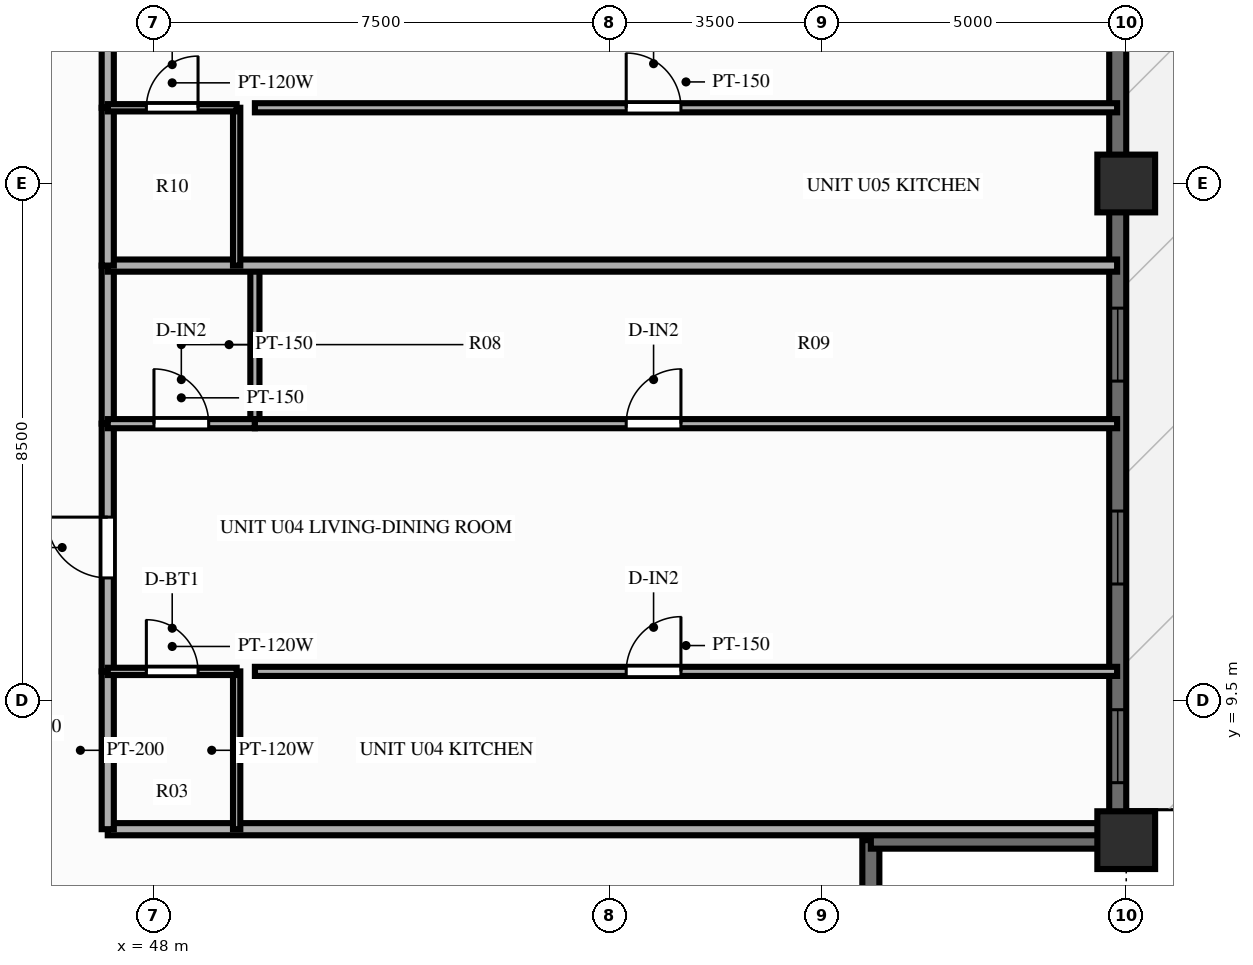
"""IFC4 building model, lengths in metres.
Left out: names, types, materials, properties, quantities, classifications, styles, units other than length and angle.
Written with IfcOpenShell. Run it as: python <this file> out.ifc"""

import sys

from ifc_helpers import new_model, si_unit, direction, frame, frame_2d, origin, origin_2d, place, context, subcontext, project, spatial, rectangle, extrude, source, transform, mapped, element, fill, save


model = new_model("IFC4")
c1 = context("Model", 3, precision=1e-05, world=origin(), true_north=direction((0.0, 1.0)))
c2 = subcontext(c1, "Body", "Model", "MODEL_VIEW")
j1 = project(units=[si_unit("LENGTHUNIT", "METRE"), si_unit("PLANEANGLEUNIT", "RADIAN")], contexts=[c1])
p1 = place(None, origin())
s1 = spatial("IfcSite", under=j1, at=p1, CompositionType="ELEMENT")
p2 = place(p1, origin())
s2 = spatial("IfcBuilding", under=s1, at=p2, CompositionType="ELEMENT")
p3 = place(p2, frame((0.0, 0.0, 101.85)))
s3 = spatial("IfcBuildingStorey", under=s2, at=p3, CompositionType="ELEMENT", Elevation=101.85)
m1 = source(origin(), c2, "Body", "SweptSolid", [
    extrude(rectangle(XDim=0.95, YDim=0.95, at=origin_2d()), origin(), (0.0, 0.0, 1.0), 3.0),
])
for number, where, z_axis, x_axis in (
    (1, (64.0, 7.2, 0.0), (0.0, 0.0, 1.0), (1.0, 0.0, 0.0)),
    (2, (64.0, 18.0, 0.0), (0.0, 0.0, 1.0), (1.0, 0.0, 0.0)),
):
    element("IfcColumn", number, at=place(p3, frame(where, z_axis=z_axis, x_axis=x_axis)), inside=s3, PredefinedType="COLUMN", context=c2, shape_type="MappedRepresentation", body=[
        mapped(m1, transform((0.0, 0.0, 0.0), scale=1.0)),
    ])
p4 = place(p3, frame((63.86, 7.2, 0.0), z_axis=(0.0, 0.0, 1.0), x_axis=(0.0, 1.0, 0.0)))
e3 = element("IfcWall", 3, at=p4, inside=s3, PredefinedType="SOLIDWALL", context=c2, shape_type="SweptSolid", body=[
    extrude(rectangle(XDim=39.6, YDim=0.28, at=frame_2d((19.8, 0.0))), origin(), (0.0, 0.0, 1.0), 2.28),
])
p5 = place(p4, frame((0.945, 0.0, 0.25)))
e4 = element("IfcOpeningElement", 4, at=p5, cuts=e3, PredefinedType="OPENING", context=c2, shape_type="SweptSolid", body=[
    extrude(rectangle(XDim=1.2, YDim=1.5, at=frame_2d((0.6, 0.75))), frame((0.0, 0.152, 0.0), z_axis=(0.0, -1.0, 0.0), x_axis=(1.0, 0.0, 0.0)), (0.0, 0.0, 1.0), 0.304),
])
p6 = place(p4, frame((4.213, 0.0, 0.25)))
e5 = element("IfcOpeningElement", 5, at=p6, cuts=e3, PredefinedType="OPENING", context=c2, shape_type="SweptSolid", body=[
    extrude(rectangle(XDim=1.2, YDim=1.5, at=frame_2d((0.6, 0.75))), frame((0.0, 0.152, 0.0), z_axis=(0.0, -1.0, 0.0), x_axis=(1.0, 0.0, 0.0)), (0.0, 0.0, 1.0), 0.304),
])
p7 = place(p4, frame((7.55, 0.0, 0.25)))
e6 = element("IfcOpeningElement", 6, at=p7, cuts=e3, PredefinedType="OPENING", context=c2, shape_type="SweptSolid", body=[
    extrude(rectangle(XDim=1.2, YDim=1.5, at=frame_2d((0.6, 0.75))), frame((0.0, 0.152, 0.0), z_axis=(0.0, -1.0, 0.0), x_axis=(1.0, 0.0, 0.0)), (0.0, 0.0, 1.0), 0.304),
])
p8 = place(p4, frame((13.483, 0.0, 0.25)))
e7 = element("IfcOpeningElement", 7, at=p8, cuts=e3, PredefinedType="OPENING", context=c2, shape_type="SweptSolid", body=[
    extrude(rectangle(XDim=1.2, YDim=1.5, at=frame_2d((0.6, 0.75))), frame((0.0, 0.152, 0.0), z_axis=(0.0, -1.0, 0.0), x_axis=(1.0, 0.0, 0.0)), (0.0, 0.0, 1.0), 0.304),
])
p9 = place(p4, frame((16.82, 0.0, 0.25)))
e8 = element("IfcOpeningElement", 8, at=p9, cuts=e3, PredefinedType="OPENING", context=c2, shape_type="SweptSolid", body=[
    extrude(rectangle(XDim=1.2, YDim=1.5, at=frame_2d((0.6, 0.75))), frame((0.0, 0.152, 0.0), z_axis=(0.0, -1.0, 0.0), x_axis=(1.0, 0.0, 0.0)), (0.0, 0.0, 1.0), 0.304),
])
p10 = place(p4, frame((19.2, 0.0, 0.25)))
e9 = element("IfcOpeningElement", 9, at=p10, cuts=e3, PredefinedType="OPENING", context=c2, shape_type="SweptSolid", body=[
    extrude(rectangle(XDim=1.2, YDim=1.5, at=frame_2d((0.6, 0.75))), frame((0.0, 0.152, 0.0), z_axis=(0.0, -1.0, 0.0), x_axis=(1.0, 0.0, 0.0)), (0.0, 0.0, 1.0), 0.304),
])
p11 = place(p4, frame((21.578, 0.0, 0.25)))
e10 = element("IfcOpeningElement", 10, at=p11, cuts=e3, PredefinedType="OPENING", context=c2, shape_type="SweptSolid", body=[
    extrude(rectangle(XDim=1.2, YDim=1.5, at=frame_2d((0.6, 0.75))), frame((0.0, 0.152, 0.0), z_axis=(0.0, -1.0, 0.0), x_axis=(1.0, 0.0, 0.0)), (0.0, 0.0, 1.0), 0.304),
])
p12 = place(p4, frame((26.313, 0.0, 0.0), z_axis=(0.0, 0.0, 1.0), x_axis=(-1.0, 0.0, 0.0)))
e11 = element("IfcOpeningElement", 11, at=p12, cuts=e3, PredefinedType="OPENING", context=c2, shape_type="SweptSolid", body=[
    extrude(rectangle(XDim=1.6, YDim=2.15, at=frame_2d((0.8, 1.075))), frame((0.0, 0.152, 0.0), z_axis=(0.0, -1.0, 0.0), x_axis=(1.0, 0.0, 0.0)), (0.0, 0.0, 1.0), 0.304),
])
p13 = place(p4, frame((29.305, 0.0, 0.25)))
e12 = element("IfcOpeningElement", 12, at=p13, cuts=e3, PredefinedType="OPENING", context=c2, shape_type="SweptSolid", body=[
    extrude(rectangle(XDim=0.7, YDim=1.5, at=frame_2d((0.35, 0.75))), frame((0.0, 0.152, 0.0), z_axis=(0.0, -1.0, 0.0), x_axis=(1.0, 0.0, 0.0)), (0.0, 0.0, 1.0), 0.304),
])
p14 = place(p4, frame((30.848, 0.0, 0.25)))
e13 = element("IfcOpeningElement", 13, at=p14, cuts=e3, PredefinedType="OPENING", context=c2, shape_type="SweptSolid", body=[
    extrude(rectangle(XDim=1.2, YDim=1.5, at=frame_2d((0.6, 0.75))), frame((0.0, 0.152, 0.0), z_axis=(0.0, -1.0, 0.0), x_axis=(1.0, 0.0, 0.0)), (0.0, 0.0, 1.0), 0.304),
])
p15 = place(p4, frame((34.183, 0.0, 0.25)))
e14 = element("IfcOpeningElement", 14, at=p15, cuts=e3, PredefinedType="OPENING", context=c2, shape_type="SweptSolid", body=[
    extrude(rectangle(XDim=1.2, YDim=1.5, at=frame_2d((0.6, 0.75))), frame((0.0, 0.152, 0.0), z_axis=(0.0, -1.0, 0.0), x_axis=(1.0, 0.0, 0.0)), (0.0, 0.0, 1.0), 0.304),
])
p16 = place(p4, frame((37.452, 0.0, 0.25)))
e15 = element("IfcOpeningElement", 15, at=p16, cuts=e3, PredefinedType="OPENING", context=c2, shape_type="SweptSolid", body=[
    extrude(rectangle(XDim=1.2, YDim=1.5, at=frame_2d((0.6, 0.75))), frame((0.0, 0.152, 0.0), z_axis=(0.0, -1.0, 0.0), x_axis=(1.0, 0.0, 0.0)), (0.0, 0.0, 1.0), 0.304),
])
for number, where, z_axis, x_axis in (
    (16, (59.8, 3.08, 0.0), (0.0, 0.0, 1.0), (0.0, 1.0, 0.0)),
    (17, (59.8, 7.2, 0.0), (0.0, 0.0, 1.0), (1.0, 0.0, 0.0)),
):
    element("IfcWall", number, at=place(p3, frame(where, z_axis=z_axis, x_axis=x_axis)), inside=s3, PredefinedType="SOLIDWALL", context=c2, shape_type="SweptSolid", body=[
        extrude(rectangle(XDim=4.12, YDim=0.28, at=frame_2d((2.06, 0.0))), origin(), (0.0, 0.0, 1.0), 2.28),
    ])
p17 = place(p3, frame((47.25, 7.38, 0.0), z_axis=(0.0, 0.0, 1.0), x_axis=(1.0, 0.0, 0.0)))
e18 = element("IfcWall", 18, at=p17, inside=s3, PredefinedType="PARTITIONING", context=c2, shape_type="SweptSolid", body=[
    extrude(rectangle(XDim=16.6, YDim=0.2, at=frame_2d((8.3, 0.0))), origin(), (0.0, 0.0, 1.0), 2.79),
])
p18 = place(p3, frame((47.25, 7.38, 0.0), z_axis=(0.0, 0.0, 1.0), x_axis=(0.0, 1.0, 0.0)))
e19 = element("IfcWall", 19, at=p18, inside=s3, PredefinedType="PARTITIONING", context=c2, shape_type="SweptSolid", body=[
    extrude(rectangle(XDim=2.596, YDim=0.2, at=frame_2d((1.298, 0.0))), origin(), (0.0, 0.0, 1.0), 2.79),
])
p19 = place(p3, frame((47.25, 9.976, 0.0), z_axis=(0.0, 0.0, 1.0), x_axis=(0.0, 1.0, 0.0)))
e20 = element("IfcWall", 20, at=p19, inside=s3, PredefinedType="PARTITIONING", context=c2, shape_type="SweptSolid", body=[
    extrude(rectangle(XDim=4.074, YDim=0.2, at=frame_2d((2.037, 0.0))), origin(), (0.0, 0.0, 1.0), 2.79),
])
p20 = place(p19, frame((1.537, 0.0, 0.0)))
e21 = element("IfcOpeningElement", 21, at=p20, cuts=e20, PredefinedType="OPENING", context=c2, shape_type="SweptSolid", body=[
    extrude(rectangle(XDim=1.0, YDim=2.15, at=frame_2d((0.5, 1.075))), frame((0.0, 0.112, 0.0), z_axis=(0.0, -1.0, 0.0), x_axis=(1.0, 0.0, 0.0)), (0.0, 0.0, 1.0), 0.224),
])
p21 = place(p3, frame((47.25, 14.05, 0.0), z_axis=(0.0, 0.0, 1.0), x_axis=(0.0, 1.0, 0.0)))
e22 = element("IfcWall", 22, at=p21, inside=s3, PredefinedType="PARTITIONING", context=c2, shape_type="SweptSolid", body=[
    extrude(rectangle(XDim=2.6, YDim=0.2, at=frame_2d((1.3, 0.0))), origin(), (0.0, 0.0, 1.0), 2.79),
])
p22 = place(p3, frame((49.37, 7.38, 0.0), z_axis=(0.0, 0.0, 1.0), x_axis=(0.0, 1.0, 0.0)))
e23 = element("IfcWall", 23, at=p22, inside=s3, PredefinedType="PARTITIONING", context=c2, shape_type="SweptSolid", body=[
    extrude(rectangle(XDim=2.596, YDim=0.12, at=frame_2d((1.298, 0.0))), origin(), (0.0, 0.0, 1.0), 2.79),
])
p23 = place(p3, frame((49.67, 14.05, 0.0), z_axis=(0.0, 0.0, 1.0), x_axis=(0.0, 1.0, 0.0)))
e24 = element("IfcWall", 24, at=p23, inside=s3, PredefinedType="PARTITIONING", context=c2, shape_type="SweptSolid", body=[
    extrude(rectangle(XDim=2.6, YDim=0.15, at=frame_2d((1.3, 0.0))), origin(), (0.0, 0.0, 1.0), 2.79),
])
p24 = place(p3, frame((47.25, 9.976, 0.0), z_axis=(0.0, 0.0, 1.0), x_axis=(1.0, 0.0, 0.0)))
e25 = element("IfcWall", 25, at=p24, inside=s3, PredefinedType="PARTITIONING", context=c2, shape_type="SweptSolid", body=[
    extrude(rectangle(XDim=2.12, YDim=0.12, at=frame_2d((1.06, 0.0))), origin(), (0.0, 0.0, 1.0), 2.79),
])
p25 = place(p24, frame((0.635, 0.0, 0.0)))
e26 = element("IfcOpeningElement", 26, at=p25, cuts=e25, PredefinedType="OPENING", context=c2, shape_type="SweptSolid", body=[
    extrude(rectangle(XDim=0.85, YDim=2.05, at=frame_2d((0.425, 1.025))), frame((0.0, 0.072, 0.0), z_axis=(0.0, -1.0, 0.0), x_axis=(1.0, 0.0, 0.0)), (0.0, 0.0, 1.0), 0.144),
])
p26 = place(p3, frame((49.67, 9.976, 0.0), z_axis=(0.0, 0.0, 1.0), x_axis=(1.0, 0.0, 0.0)))
e27 = element("IfcWall", 27, at=p26, inside=s3, PredefinedType="PARTITIONING", context=c2, shape_type="SweptSolid", body=[
    extrude(rectangle(XDim=14.18, YDim=0.15, at=frame_2d((7.09, 0.0))), origin(), (0.0, 0.0, 1.0), 2.79),
])
p27 = place(p26, frame((6.107, 0.0, 0.0)))
e28 = element("IfcOpeningElement", 28, at=p27, cuts=e27, PredefinedType="OPENING", context=c2, shape_type="SweptSolid", body=[
    extrude(rectangle(XDim=0.9, YDim=2.1, at=frame_2d((0.45, 1.05))), frame((0.0, 0.087, 0.0), z_axis=(0.0, -1.0, 0.0), x_axis=(1.0, 0.0, 0.0)), (0.0, 0.0, 1.0), 0.174),
])
p28 = place(p3, frame((47.25, 14.05, 0.0), z_axis=(0.0, 0.0, 1.0), x_axis=(1.0, 0.0, 0.0)))
e29 = element("IfcWall", 29, at=p28, inside=s3, PredefinedType="PARTITIONING", context=c2, shape_type="SweptSolid", body=[
    extrude(rectangle(XDim=2.42, YDim=0.15, at=frame_2d((1.21, 0.0))), origin(), (0.0, 0.0, 1.0), 2.79),
])
p29 = place(p28, frame((0.76, 0.0, 0.0)))
e30 = element("IfcOpeningElement", 30, at=p29, cuts=e29, PredefinedType="OPENING", context=c2, shape_type="SweptSolid", body=[
    extrude(rectangle(XDim=0.9, YDim=2.1, at=frame_2d((0.45, 1.05))), frame((0.0, 0.087, 0.0), z_axis=(0.0, -1.0, 0.0), x_axis=(1.0, 0.0, 0.0)), (0.0, 0.0, 1.0), 0.174),
])
p30 = place(p3, frame((49.67, 14.05, 0.0), z_axis=(0.0, 0.0, 1.0), x_axis=(1.0, 0.0, 0.0)))
e31 = element("IfcWall", 31, at=p30, inside=s3, PredefinedType="PARTITIONING", context=c2, shape_type="SweptSolid", body=[
    extrude(rectangle(XDim=14.18, YDim=0.15, at=frame_2d((7.09, 0.0))), origin(), (0.0, 0.0, 1.0), 2.79),
])
p31 = place(p30, frame((6.107, 0.0, 0.0)))
e32 = element("IfcOpeningElement", 32, at=p31, cuts=e31, PredefinedType="OPENING", context=c2, shape_type="SweptSolid", body=[
    extrude(rectangle(XDim=0.9, YDim=2.1, at=frame_2d((0.45, 1.05))), frame((0.0, 0.087, 0.0), z_axis=(0.0, -1.0, 0.0), x_axis=(1.0, 0.0, 0.0)), (0.0, 0.0, 1.0), 0.174),
])
p32 = place(p3, frame((47.25, 16.65, 0.0), z_axis=(0.0, 0.0, 1.0), x_axis=(1.0, 0.0, 0.0)))
e33 = element("IfcWall", 33, at=p32, inside=s3, PredefinedType="PARTITIONING", context=c2, shape_type="SweptSolid", body=[
    extrude(rectangle(XDim=16.6, YDim=0.2, at=frame_2d((8.3, 0.0))), origin(), (0.0, 0.0, 1.0), 2.79),
])
p33 = place(p3, frame((47.25, 16.65, 0.0), z_axis=(0.0, 0.0, 1.0), x_axis=(0.0, 1.0, 0.0)))
e34 = element("IfcWall", 34, at=p33, inside=s3, PredefinedType="PARTITIONING", context=c2, shape_type="SweptSolid", body=[
    extrude(rectangle(XDim=2.596, YDim=0.2, at=frame_2d((1.298, 0.0))), origin(), (0.0, 0.0, 1.0), 2.79),
])
p34 = place(p3, frame((47.25, 19.246, 0.0), z_axis=(0.0, 0.0, 1.0), x_axis=(0.0, 1.0, 0.0)))
e35 = element("IfcWall", 35, at=p34, inside=s3, PredefinedType="PARTITIONING", context=c2, shape_type="SweptSolid", body=[
    extrude(rectangle(XDim=4.074, YDim=0.2, at=frame_2d((2.037, 0.0))), origin(), (0.0, 0.0, 1.0), 2.79),
])
p35 = place(p34, frame((1.537, 0.0, 0.0)))
e36 = element("IfcOpeningElement", 36, at=p35, cuts=e35, PredefinedType="OPENING", context=c2, shape_type="SweptSolid", body=[
    extrude(rectangle(XDim=1.0, YDim=2.15, at=frame_2d((0.5, 1.075))), frame((0.0, 0.112, 0.0), z_axis=(0.0, -1.0, 0.0), x_axis=(1.0, 0.0, 0.0)), (0.0, 0.0, 1.0), 0.224),
])
p36 = place(p3, frame((49.37, 16.65, 0.0), z_axis=(0.0, 0.0, 1.0), x_axis=(0.0, 1.0, 0.0)))
e37 = element("IfcWall", 37, at=p36, inside=s3, PredefinedType="PARTITIONING", context=c2, shape_type="SweptSolid", body=[
    extrude(rectangle(XDim=2.596, YDim=0.12, at=frame_2d((1.298, 0.0))), origin(), (0.0, 0.0, 1.0), 2.79),
])
p37 = place(p3, frame((47.25, 19.246, 0.0), z_axis=(0.0, 0.0, 1.0), x_axis=(1.0, 0.0, 0.0)))
e38 = element("IfcWall", 38, at=p37, inside=s3, PredefinedType="PARTITIONING", context=c2, shape_type="SweptSolid", body=[
    extrude(rectangle(XDim=2.12, YDim=0.12, at=frame_2d((1.06, 0.0))), origin(), (0.0, 0.0, 1.0), 2.79),
])
p38 = place(p37, frame((0.635, 0.0, 0.0)))
e39 = element("IfcOpeningElement", 39, at=p38, cuts=e38, PredefinedType="OPENING", context=c2, shape_type="SweptSolid", body=[
    extrude(rectangle(XDim=0.85, YDim=2.05, at=frame_2d((0.425, 1.025))), frame((0.0, 0.072, 0.0), z_axis=(0.0, -1.0, 0.0), x_axis=(1.0, 0.0, 0.0)), (0.0, 0.0, 1.0), 0.144),
])
p39 = place(p3, frame((49.67, 19.246, 0.0), z_axis=(0.0, 0.0, 1.0), x_axis=(1.0, 0.0, 0.0)))
e40 = element("IfcWall", 40, at=p39, inside=s3, PredefinedType="PARTITIONING", context=c2, shape_type="SweptSolid", body=[
    extrude(rectangle(XDim=14.18, YDim=0.15, at=frame_2d((7.09, 0.0))), origin(), (0.0, 0.0, 1.0), 2.79),
])
p40 = place(p39, frame((6.107, 0.0, 0.0)))
e41 = element("IfcOpeningElement", 41, at=p40, cuts=e40, PredefinedType="OPENING", context=c2, shape_type="SweptSolid", body=[
    extrude(rectangle(XDim=0.9, YDim=2.1, at=frame_2d((0.45, 1.05))), frame((0.0, 0.087, 0.0), z_axis=(0.0, -1.0, 0.0), x_axis=(1.0, 0.0, 0.0)), (0.0, 0.0, 1.0), 0.174),
])
m2 = source(origin(), c2, "Body", "SweptSolid", [
    extrude(rectangle(XDim=1.2, YDim=1.5, at=frame_2d((0.6, 0.75))), frame((0.0, 0.03, 0.0), z_axis=(0.0, -1.0, 0.0), x_axis=(1.0, 0.0, 0.0)), (0.0, 0.0, 1.0), 0.06),
])
p41 = place(p5, origin())
e42 = element("IfcWindow", 42, at=p41, inside=s3, PartitioningType="SINGLE_PANEL", PredefinedType="WINDOW", context=c2, shape_type="MappedRepresentation", body=[
    mapped(m2, transform((0.0, 0.0, 0.0), scale=1.0)),
])
fill(e4, e42)
p42 = place(p6, origin())
e43 = element("IfcWindow", 43, at=p42, inside=s3, PartitioningType="SINGLE_PANEL", PredefinedType="WINDOW", context=c2, shape_type="MappedRepresentation", body=[
    mapped(m2, transform((0.0, 0.0, 0.0), scale=1.0)),
])
fill(e5, e43)
p43 = place(p7, origin())
e44 = element("IfcWindow", 44, at=p43, inside=s3, PartitioningType="SINGLE_PANEL", PredefinedType="WINDOW", context=c2, shape_type="MappedRepresentation", body=[
    mapped(m2, transform((0.0, 0.0, 0.0), scale=1.0)),
])
fill(e6, e44)
m3 = source(origin(), c2, "Body", "SweptSolid", [
    extrude(rectangle(XDim=1.0, YDim=2.15, at=frame_2d((0.5, 1.075))), frame((0.0, 0.025, 0.0), z_axis=(0.0, -1.0, 0.0), x_axis=(1.0, 0.0, 0.0)), (0.0, 0.0, 1.0), 0.05),
])
p44 = place(p20, origin())
e45 = element("IfcDoor", 45, at=p44, inside=s3, OperationType="SINGLE_SWING_RIGHT", PredefinedType="DOOR", context=c2, shape_type="MappedRepresentation", body=[
    mapped(m3, transform((0.0, 0.0, 0.0), scale=1.0)),
])
fill(e21, e45)
m4 = source(origin(), c2, "Body", "SweptSolid", [
    extrude(rectangle(XDim=0.85, YDim=2.05, at=frame_2d((0.425, 1.025))), frame((0.0, 0.025, 0.0), z_axis=(0.0, -1.0, 0.0), x_axis=(1.0, 0.0, 0.0)), (0.0, 0.0, 1.0), 0.05),
])
p45 = place(p25, origin())
e46 = element("IfcDoor", 46, at=p45, inside=s3, OperationType="SINGLE_SWING_LEFT", PredefinedType="DOOR", context=c2, shape_type="MappedRepresentation", body=[
    mapped(m4, transform((0.0, 0.0, 0.0), scale=1.0)),
])
fill(e26, e46)
m5 = source(origin(), c2, "Body", "SweptSolid", [
    extrude(rectangle(XDim=0.9, YDim=2.1, at=frame_2d((0.45, 1.05))), frame((0.0, 0.025, 0.0), z_axis=(0.0, -1.0, 0.0), x_axis=(1.0, 0.0, 0.0)), (0.0, 0.0, 1.0), 0.05),
])
p46 = place(p27, origin())
e47 = element("IfcDoor", 47, at=p46, inside=s3, OperationType="SINGLE_SWING_RIGHT", PredefinedType="DOOR", context=c2, shape_type="MappedRepresentation", body=[
    mapped(m5, transform((0.0, 0.0, 0.0), scale=1.0)),
])
fill(e28, e47)
p47 = place(p29, origin())
e48 = element("IfcDoor", 48, at=p47, inside=s3, OperationType="SINGLE_SWING_LEFT", PredefinedType="DOOR", context=c2, shape_type="MappedRepresentation", body=[
    mapped(m5, transform((0.0, 0.0, 0.0), scale=1.0)),
])
fill(e30, e48)
p48 = place(p31, origin())
e49 = element("IfcDoor", 49, at=p48, inside=s3, OperationType="SINGLE_SWING_RIGHT", PredefinedType="DOOR", context=c2, shape_type="MappedRepresentation", body=[
    mapped(m5, transform((0.0, 0.0, 0.0), scale=1.0)),
])
fill(e32, e49)
p49 = place(p38, origin())
e50 = element("IfcDoor", 50, at=p49, inside=s3, OperationType="SINGLE_SWING_RIGHT", PredefinedType="DOOR", context=c2, shape_type="MappedRepresentation", body=[
    mapped(m4, transform((0.0, 0.0, 0.0), scale=1.0)),
])
fill(e39, e50)
p50 = place(p40, origin())
e51 = element("IfcDoor", 51, at=p50, inside=s3, OperationType="SINGLE_SWING_LEFT", PredefinedType="DOOR", context=c2, shape_type="MappedRepresentation", body=[
    mapped(m5, transform((0.0, 0.0, 0.0), scale=1.0)),
])
fill(e41, e51)
save(model, sys.argv[1])
